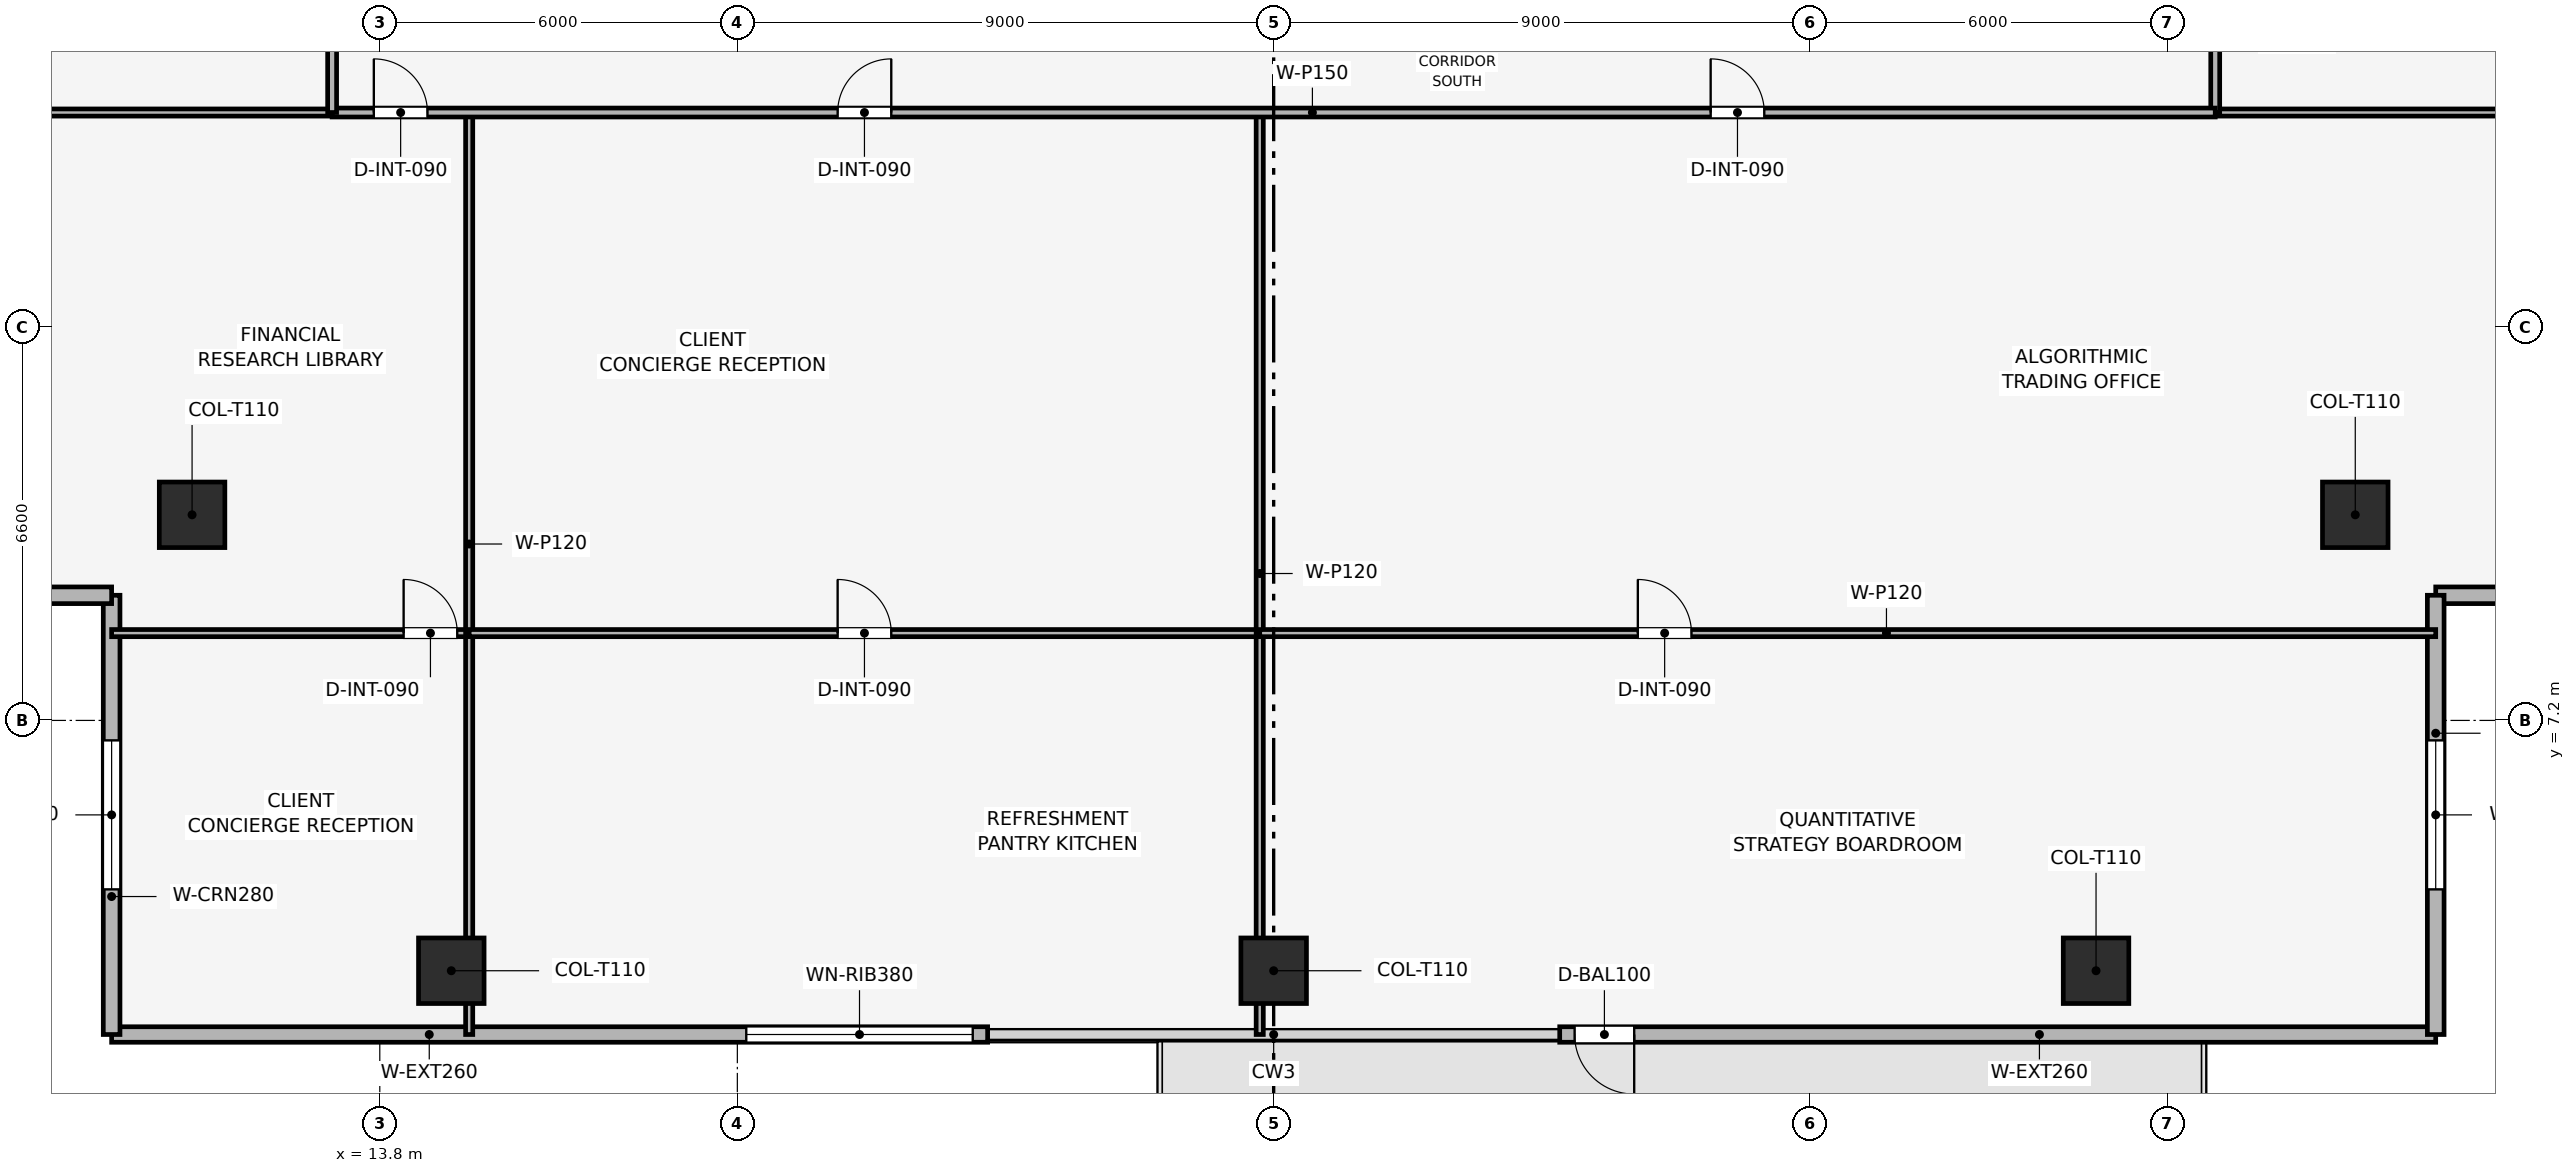
"""IFC4 building model, lengths in metres.
Left out: names, types, materials, properties, quantities, classifications, styles, units other than length and angle.
Written with IfcOpenShell. Run it as: python <this file> out.ifc"""

import sys

from ifc_helpers import new_model, si_unit, direction, frame, frame_2d, origin, origin_2d, place, context, subcontext, project, spatial, rectangle, extrude, element, fill, save


model = new_model("IFC4")
c1 = context("Model", 3, precision=1e-05, world=origin(), true_north=direction((0.0, 1.0)))
c2 = subcontext(c1, "Body", "Model", "MODEL_VIEW")
j1 = project(units=[si_unit("LENGTHUNIT", "METRE"), si_unit("PLANEANGLEUNIT", "RADIAN")], contexts=[c1])
p1 = place(None, origin())
s1 = spatial("IfcSite", under=j1, at=p1, CompositionType="ELEMENT")
p2 = place(p1, origin())
s2 = spatial("IfcBuilding", under=s1, at=p2, CompositionType="ELEMENT")
p3 = place(p2, frame((0.0, 0.0, 226.2)))
s3 = spatial("IfcBuildingStorey", under=s2, at=p3, CompositionType="ELEMENT", Elevation=226.2)
for number, where, z_axis, x_axis in (
    (1, (15.0, 3.0, 0.003), (0.0, 0.0, 1.0), (1.0, 0.0, 0.0)),
    (2, (28.8, 3.0, 0.003), (0.0, 0.0, 1.0), (1.0, 0.0, 0.0)),
    (3, (42.6, 3.0, 0.003), (0.0, 0.0, 1.0), (1.0, 0.0, 0.0)),
    (4, (10.65, 10.65, 0.003), (0.0, 0.0, 1.0), (1.0, 0.0, 0.0)),
    (5, (46.95, 10.65, 0.003), (0.0, 0.0, 1.0), (1.0, 0.0, 0.0)),
):
    element("IfcColumn", number, at=place(p3, frame(where, z_axis=z_axis, x_axis=x_axis)), inside=s3, PredefinedType="COLUMN", context=c2, shape_type="SweptSolid", body=[
        extrude(rectangle(XDim=1.1, YDim=1.1, at=origin_2d()), origin(), (0.0, 0.0, 1.0), 3.494),
    ])
p4 = place(p3, frame((48.3, 1.93, 0.0), z_axis=(0.0, 0.0, 1.0), x_axis=(-1.0, 0.0, 0.0)))
e6 = element("IfcWall", 6, at=p4, inside=s3, PredefinedType="SOLIDWALL", context=c2, shape_type="SweptSolid", body=[
    extrude(rectangle(XDim=14.7, YDim=0.26, at=frame_2d((7.35, 0.0))), origin(), (0.0, 0.0, 1.0), 3.5),
])
p5 = place(p4, frame((13.45, 0.0, 0.0)))
e7 = element("IfcOpeningElement", 7, at=p5, cuts=e6, PredefinedType="OPENING", context=c2, shape_type="SweptSolid", body=[
    extrude(rectangle(XDim=1.0, YDim=2.2, at=frame_2d((0.5, 1.1))), frame((0.0, 0.14, 0.0), z_axis=(0.0, -1.0, 0.0), x_axis=(1.0, 0.0, 0.0)), (0.0, 0.0, 1.0), 0.28),
])
p6 = place(p3, frame((24.0, 1.93, 0.0), z_axis=(0.0, 0.0, 1.0), x_axis=(-1.0, 0.0, 0.0)))
e8 = element("IfcWall", 8, at=p6, inside=s3, PredefinedType="SOLIDWALL", context=c2, shape_type="SweptSolid", body=[
    extrude(rectangle(XDim=14.7, YDim=0.26, at=frame_2d((7.35, 0.0))), origin(), (0.0, 0.0, 1.0), 3.5),
])
p7 = place(p6, frame((0.25, 0.0, 0.9)))
e9 = element("IfcOpeningElement", 9, at=p7, cuts=e8, PredefinedType="OPENING", context=c2, shape_type="SweptSolid", body=[
    extrude(rectangle(XDim=3.8, YDim=1.9, at=frame_2d((1.9, 0.95))), frame((0.0, 0.14, 0.0), z_axis=(0.0, -1.0, 0.0), x_axis=(1.0, 0.0, 0.0)), (0.0, 0.0, 1.0), 0.28),
])
p8 = place(p3, frame((9.3, 1.93, 0.0), z_axis=(0.0, 0.0, 1.0), x_axis=(0.0, 1.0, 0.0)))
e10 = element("IfcWall", 10, at=p8, inside=s3, PredefinedType="SOLIDWALL", context=c2, shape_type="SweptSolid", body=[
    extrude(rectangle(XDim=7.37, YDim=0.28, at=frame_2d((3.685, 0.0))), origin(), (0.0, 0.0, 1.0), 3.5),
])
p9 = place(p8, frame((2.435, 0.0, 0.9)))
e11 = element("IfcOpeningElement", 11, at=p9, cuts=e10, PredefinedType="OPENING", context=c2, shape_type="SweptSolid", body=[
    extrude(rectangle(XDim=2.5, YDim=1.9, at=frame_2d((1.25, 0.95))), frame((0.0, 0.15, 0.0), z_axis=(0.0, -1.0, 0.0), x_axis=(1.0, 0.0, 0.0)), (0.0, 0.0, 1.0), 0.3),
])
p10 = place(p3, frame((9.3, 9.3, 0.0), z_axis=(0.0, 0.0, 1.0), x_axis=(-1.0, 0.0, 0.0)))
e12 = element("IfcWall", 12, at=p10, inside=s3, PredefinedType="SOLIDWALL", context=c2, shape_type="SweptSolid", body=[
    extrude(rectangle(XDim=7.37, YDim=0.28, at=frame_2d((3.685, 0.0))), origin(), (0.0, 0.0, 1.0), 3.5),
])
p11 = place(p10, frame((2.435, 0.0, 0.9)))
e13 = element("IfcOpeningElement", 13, at=p11, cuts=e12, PredefinedType="OPENING", context=c2, shape_type="SweptSolid", body=[
    extrude(rectangle(XDim=2.5, YDim=1.9, at=frame_2d((1.25, 0.95))), frame((0.0, 0.15, 0.0), z_axis=(0.0, -1.0, 0.0), x_axis=(1.0, 0.0, 0.0)), (0.0, 0.0, 1.0), 0.3),
])
p12 = place(p3, frame((55.67, 9.3, 0.0), z_axis=(0.0, 0.0, 1.0), x_axis=(-1.0, 0.0, 0.0)))
e14 = element("IfcWall", 14, at=p12, inside=s3, PredefinedType="SOLIDWALL", context=c2, shape_type="SweptSolid", body=[
    extrude(rectangle(XDim=7.37, YDim=0.28, at=frame_2d((3.685, 0.0))), origin(), (0.0, 0.0, 1.0), 3.5),
])
p13 = place(p12, frame((2.435, 0.0, 0.9)))
e15 = element("IfcOpeningElement", 15, at=p13, cuts=e14, PredefinedType="OPENING", context=c2, shape_type="SweptSolid", body=[
    extrude(rectangle(XDim=2.5, YDim=1.9, at=frame_2d((1.25, 0.95))), frame((0.0, 0.15, 0.0), z_axis=(0.0, -1.0, 0.0), x_axis=(1.0, 0.0, 0.0)), (0.0, 0.0, 1.0), 0.3),
])
p14 = place(p3, frame((48.3, 9.3, 0.0), z_axis=(0.0, 0.0, 1.0), x_axis=(0.0, -1.0, 0.0)))
e16 = element("IfcWall", 16, at=p14, inside=s3, PredefinedType="SOLIDWALL", context=c2, shape_type="SweptSolid", body=[
    extrude(rectangle(XDim=7.37, YDim=0.28, at=frame_2d((3.685, 0.0))), origin(), (0.0, 0.0, 1.0), 3.5),
])
p15 = place(p14, frame((2.435, 0.0, 0.9)))
e17 = element("IfcOpeningElement", 17, at=p15, cuts=e16, PredefinedType="OPENING", context=c2, shape_type="SweptSolid", body=[
    extrude(rectangle(XDim=2.5, YDim=1.9, at=frame_2d((1.25, 0.95))), frame((0.0, 0.15, 0.0), z_axis=(0.0, -1.0, 0.0), x_axis=(1.0, 0.0, 0.0)), (0.0, 0.0, 1.0), 0.3),
])
p16 = place(p3, frame((9.3, 8.665, 0.0), z_axis=(0.0, 0.0, 1.0), x_axis=(1.0, 0.0, 0.0)))
e18 = element("IfcWall", 18, at=p16, inside=s3, PredefinedType="PARTITIONING", context=c2, shape_type="SweptSolid", body=[
    extrude(rectangle(XDim=6.0, YDim=0.12, at=frame_2d((3.0, 0.0))), origin(), (0.0, 0.0, 1.0), 2.885),
])
p17 = place(p16, frame((4.9, 0.0, 0.0)))
e19 = element("IfcOpeningElement", 19, at=p17, cuts=e18, PredefinedType="OPENING", context=c2, shape_type="SweptSolid", body=[
    extrude(rectangle(XDim=0.9, YDim=2.1, at=frame_2d((0.45, 1.05))), frame((0.0, 0.07, 0.0), z_axis=(0.0, -1.0, 0.0), x_axis=(1.0, 0.0, 0.0)), (0.0, 0.0, 1.0), 0.14),
])
p18 = place(p3, frame((15.3, 1.93, 0.0), z_axis=(0.0, 0.0, 1.0), x_axis=(0.0, 1.0, 0.0)))
e20 = element("IfcWall", 20, at=p18, inside=s3, PredefinedType="PARTITIONING", context=c2, shape_type="SweptSolid", body=[
    extrude(rectangle(XDim=15.47, YDim=0.12, at=frame_2d((7.735, 0.0))), origin(), (0.0, 0.0, 1.0), 2.885),
])
p19 = place(p3, frame((15.3, 8.665, 0.0), z_axis=(0.0, 0.0, 1.0), x_axis=(1.0, 0.0, 0.0)))
e21 = element("IfcWall", 21, at=p19, inside=s3, PredefinedType="PARTITIONING", context=c2, shape_type="SweptSolid", body=[
    extrude(rectangle(XDim=13.266, YDim=0.12, at=frame_2d((6.633, 0.0))), origin(), (0.0, 0.0, 1.0), 3.035),
])
p20 = place(p19, frame((6.183, 0.0, 0.0)))
e22 = element("IfcOpeningElement", 22, at=p20, cuts=e21, PredefinedType="OPENING", context=c2, shape_type="SweptSolid", body=[
    extrude(rectangle(XDim=0.9, YDim=2.1, at=frame_2d((0.45, 1.05))), frame((0.0, 0.07, 0.0), z_axis=(0.0, -1.0, 0.0), x_axis=(1.0, 0.0, 0.0)), (0.0, 0.0, 1.0), 0.14),
])
p21 = place(p3, frame((28.566, 1.93, 0.0), z_axis=(0.0, 0.0, 1.0), x_axis=(0.0, 1.0, 0.0)))
e23 = element("IfcWall", 23, at=p21, inside=s3, PredefinedType="PARTITIONING", context=c2, shape_type="SweptSolid", body=[
    extrude(rectangle(XDim=15.47, YDim=0.12, at=frame_2d((7.735, 0.0))), origin(), (0.0, 0.0, 1.0), 2.885),
])
p22 = place(p3, frame((28.566, 8.665, 0.0), z_axis=(0.0, 0.0, 1.0), x_axis=(1.0, 0.0, 0.0)))
e24 = element("IfcWall", 24, at=p22, inside=s3, PredefinedType="PARTITIONING", context=c2, shape_type="SweptSolid", body=[
    extrude(rectangle(XDim=19.734, YDim=0.12, at=frame_2d((9.867, 0.0))), origin(), (0.0, 0.0, 1.0), 2.885),
])
p23 = place(p22, frame((6.345, 0.0, 0.0)))
e25 = element("IfcOpeningElement", 25, at=p23, cuts=e24, PredefinedType="OPENING", context=c2, shape_type="SweptSolid", body=[
    extrude(rectangle(XDim=0.9, YDim=2.1, at=frame_2d((0.45, 1.05))), frame((0.0, 0.07, 0.0), z_axis=(0.0, -1.0, 0.0), x_axis=(1.0, 0.0, 0.0)), (0.0, 0.0, 1.0), 0.14),
])
p24 = place(p3, frame((1.93, 17.4, 0.0), z_axis=(0.0, 0.0, 1.0), x_axis=(1.0, 0.0, 0.0)))
e26 = element("IfcWall", 26, at=p24, inside=s3, PredefinedType="PARTITIONING", context=c2, shape_type="SweptSolid", body=[
    extrude(rectangle(XDim=11.07, YDim=0.12, at=frame_2d((5.535, 0.0))), origin(), (0.0, 0.0, 1.0), 2.885),
])
p25 = place(p3, frame((44.6, 17.4, 0.0), z_axis=(0.0, 0.0, 1.0), x_axis=(1.0, 0.0, 0.0)))
e27 = element("IfcWall", 27, at=p25, inside=s3, PredefinedType="PARTITIONING", context=c2, shape_type="SweptSolid", body=[
    extrude(rectangle(XDim=11.07, YDim=0.12, at=frame_2d((5.535, 0.0))), origin(), (0.0, 0.0, 1.0), 2.885),
])
p26 = place(p3, frame((44.6, 17.4, 0.0), z_axis=(0.0, 0.0, 1.0), x_axis=(0.0, 1.0, 0.0)))
e28 = element("IfcWall", 28, at=p26, inside=s3, PredefinedType="PARTITIONING", context=c2, shape_type="SweptSolid", body=[
    extrude(rectangle(XDim=2.4, YDim=0.15, at=frame_2d((1.2, 0.0))), origin(), (0.0, 0.0, 1.0), 3.5),
])
p27 = place(p3, frame((13.0, 17.4, 0.0), z_axis=(0.0, 0.0, 1.0), x_axis=(1.0, 0.0, 0.0)))
e29 = element("IfcWall", 29, at=p27, inside=s3, PredefinedType="PARTITIONING", context=c2, shape_type="SweptSolid", body=[
    extrude(rectangle(XDim=31.6, YDim=0.15, at=frame_2d((15.8, 0.0))), origin(), (0.0, 0.0, 1.0), 3.035),
])
p28 = place(p27, frame((0.7, 0.0, 0.0)))
e30 = element("IfcOpeningElement", 30, at=p28, cuts=e29, PredefinedType="OPENING", context=c2, shape_type="SweptSolid", body=[
    extrude(rectangle(XDim=0.9, YDim=2.1, at=frame_2d((0.45, 1.05))), frame((0.0, 0.085, 0.0), z_axis=(0.0, -1.0, 0.0), x_axis=(1.0, 0.0, 0.0)), (0.0, 0.0, 1.0), 0.17),
])
p29 = place(p27, frame((8.483, 0.0, 0.0)))
e31 = element("IfcOpeningElement", 31, at=p29, cuts=e29, PredefinedType="OPENING", context=c2, shape_type="SweptSolid", body=[
    extrude(rectangle(XDim=0.9, YDim=2.1, at=frame_2d((0.45, 1.05))), frame((0.0, 0.085, 0.0), z_axis=(0.0, -1.0, 0.0), x_axis=(1.0, 0.0, 0.0)), (0.0, 0.0, 1.0), 0.17),
])
p30 = place(p27, frame((23.133, 0.0, 0.0)))
e32 = element("IfcOpeningElement", 32, at=p30, cuts=e29, PredefinedType="OPENING", context=c2, shape_type="SweptSolid", body=[
    extrude(rectangle(XDim=0.9, YDim=2.1, at=frame_2d((0.45, 1.05))), frame((0.0, 0.085, 0.0), z_axis=(0.0, -1.0, 0.0), x_axis=(1.0, 0.0, 0.0)), (0.0, 0.0, 1.0), 0.17),
])
p31 = place(p3, frame((13.0, 17.4, 0.0), z_axis=(0.0, 0.0, 1.0), x_axis=(0.0, 1.0, 0.0)))
e33 = element("IfcWall", 33, at=p31, inside=s3, PredefinedType="PARTITIONING", context=c2, shape_type="SweptSolid", body=[
    extrude(rectangle(XDim=22.8, YDim=0.15, at=frame_2d((11.4, 0.0))), origin(), (0.0, 0.0, 1.0), 3.035),
])
p32 = place(p31, frame((10.95, 0.0, 0.0)))
e34 = element("IfcOpeningElement", 34, at=p32, cuts=e33, PredefinedType="OPENING", context=c2, shape_type="SweptSolid", body=[
    extrude(rectangle(XDim=0.9, YDim=2.1, at=frame_2d((0.45, 1.05))), frame((0.0, 0.085, 0.0), z_axis=(0.0, -1.0, 0.0), x_axis=(1.0, 0.0, 0.0)), (0.0, 0.0, 1.0), 0.17),
])
p33 = place(p5, origin())
e35 = element("IfcDoor", 35, at=p33, inside=s3, OperationType="SINGLE_SWING_LEFT", PredefinedType="DOOR", context=c2, shape_type="SweptSolid", body=[
    extrude(rectangle(XDim=1.0, YDim=2.2, at=frame_2d((0.5, 1.1))), frame((0.0, 0.025, 0.0), z_axis=(0.0, -1.0, 0.0), x_axis=(1.0, 0.0, 0.0)), (0.0, 0.0, 1.0), 0.05),
])
fill(e7, e35)
p34 = place(p7, origin())
e36 = element("IfcWindow", 36, at=p34, inside=s3, PartitioningType="SINGLE_PANEL", PredefinedType="WINDOW", context=c2, shape_type="SweptSolid", body=[
    extrude(rectangle(XDim=3.8, YDim=1.9, at=frame_2d((1.9, 0.95))), frame((0.0, 0.03, 0.0), z_axis=(0.0, -1.0, 0.0), x_axis=(1.0, 0.0, 0.0)), (0.0, 0.0, 1.0), 0.06),
])
fill(e9, e36)
p35 = place(p9, origin())
e37 = element("IfcWindow", 37, at=p35, inside=s3, PartitioningType="SINGLE_PANEL", PredefinedType="WINDOW", context=c2, shape_type="SweptSolid", body=[
    extrude(rectangle(XDim=2.5, YDim=1.9, at=frame_2d((1.25, 0.95))), frame((0.0, 0.03, 0.0), z_axis=(0.0, -1.0, 0.0), x_axis=(1.0, 0.0, 0.0)), (0.0, 0.0, 1.0), 0.06),
])
fill(e11, e37)
p36 = place(p15, origin())
e38 = element("IfcWindow", 38, at=p36, inside=s3, PartitioningType="SINGLE_PANEL", PredefinedType="WINDOW", context=c2, shape_type="SweptSolid", body=[
    extrude(rectangle(XDim=2.5, YDim=1.9, at=frame_2d((1.25, 0.95))), frame((0.0, 0.03, 0.0), z_axis=(0.0, -1.0, 0.0), x_axis=(1.0, 0.0, 0.0)), (0.0, 0.0, 1.0), 0.06),
])
fill(e17, e38)
p37 = place(p17, origin())
e39 = element("IfcDoor", 39, at=p37, inside=s3, OperationType="SINGLE_SWING_LEFT", PredefinedType="DOOR", context=c2, shape_type="SweptSolid", body=[
    extrude(rectangle(XDim=0.9, YDim=2.1, at=frame_2d((0.45, 1.05))), frame((0.0, 0.025, 0.0), z_axis=(0.0, -1.0, 0.0), x_axis=(1.0, 0.0, 0.0)), (0.0, 0.0, 1.0), 0.05),
])
fill(e19, e39)
p38 = place(p20, origin())
e40 = element("IfcDoor", 40, at=p38, inside=s3, OperationType="SINGLE_SWING_LEFT", PredefinedType="DOOR", context=c2, shape_type="SweptSolid", body=[
    extrude(rectangle(XDim=0.9, YDim=2.1, at=frame_2d((0.45, 1.05))), frame((0.0, 0.025, 0.0), z_axis=(0.0, -1.0, 0.0), x_axis=(1.0, 0.0, 0.0)), (0.0, 0.0, 1.0), 0.05),
])
fill(e22, e40)
p39 = place(p23, origin())
e41 = element("IfcDoor", 41, at=p39, inside=s3, OperationType="SINGLE_SWING_LEFT", PredefinedType="DOOR", context=c2, shape_type="SweptSolid", body=[
    extrude(rectangle(XDim=0.9, YDim=2.1, at=frame_2d((0.45, 1.05))), frame((0.0, 0.025, 0.0), z_axis=(0.0, -1.0, 0.0), x_axis=(1.0, 0.0, 0.0)), (0.0, 0.0, 1.0), 0.05),
])
fill(e25, e41)
p40 = place(p28, origin())
e42 = element("IfcDoor", 42, at=p40, inside=s3, OperationType="SINGLE_SWING_LEFT", PredefinedType="DOOR", context=c2, shape_type="SweptSolid", body=[
    extrude(rectangle(XDim=0.9, YDim=2.1, at=frame_2d((0.45, 1.05))), frame((0.0, 0.025, 0.0), z_axis=(0.0, -1.0, 0.0), x_axis=(1.0, 0.0, 0.0)), (0.0, 0.0, 1.0), 0.05),
])
fill(e30, e42)
p41 = place(p29, origin())
e43 = element("IfcDoor", 43, at=p41, inside=s3, OperationType="SINGLE_SWING_RIGHT", PredefinedType="DOOR", context=c2, shape_type="SweptSolid", body=[
    extrude(rectangle(XDim=0.9, YDim=2.1, at=frame_2d((0.45, 1.05))), frame((0.0, 0.025, 0.0), z_axis=(0.0, -1.0, 0.0), x_axis=(1.0, 0.0, 0.0)), (0.0, 0.0, 1.0), 0.05),
])
fill(e31, e43)
p42 = place(p30, origin())
e44 = element("IfcDoor", 44, at=p42, inside=s3, OperationType="SINGLE_SWING_LEFT", PredefinedType="DOOR", context=c2, shape_type="SweptSolid", body=[
    extrude(rectangle(XDim=0.9, YDim=2.1, at=frame_2d((0.45, 1.05))), frame((0.0, 0.025, 0.0), z_axis=(0.0, -1.0, 0.0), x_axis=(1.0, 0.0, 0.0)), (0.0, 0.0, 1.0), 0.05),
])
fill(e32, e44)
save(model, sys.argv[1])
